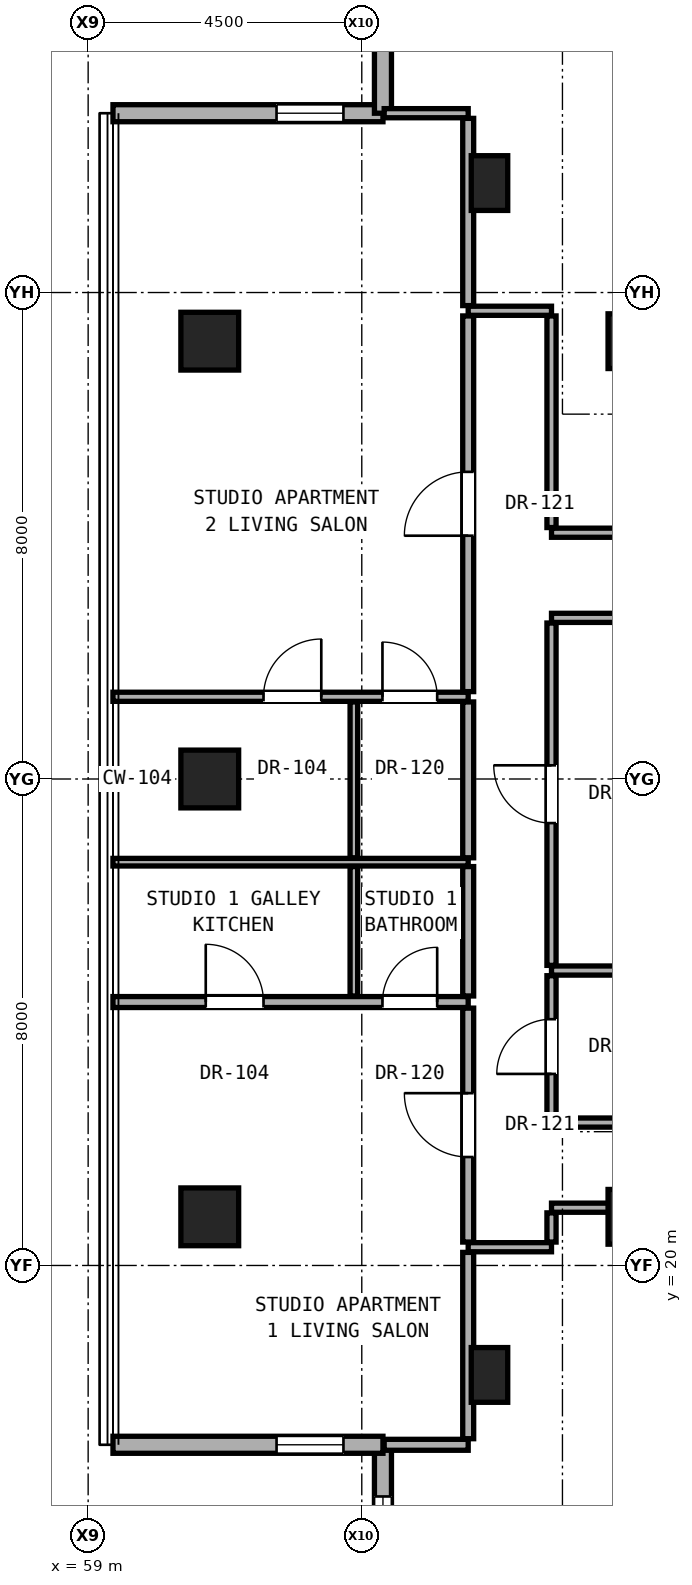
"""IFC4 building model, lengths in metres.
Left out: names, types, materials, properties, quantities, classifications, styles, units other than length and angle.
Written with IfcOpenShell. Run it as: python <this file> out.ifc"""

import sys

from ifc_helpers import new_model, si_unit, direction, frame, frame_2d, origin, origin_2d, place, context, subcontext, project, spatial, rectangle, hollow_rectangle, extrude, element, fill, save


model = new_model("IFC4")
c1 = context("Model", 3, precision=1e-05, world=origin(), true_north=direction((0.0, 1.0)))
c2 = subcontext(c1, "Body", "Model", "MODEL_VIEW")
j1 = project(units=[si_unit("LENGTHUNIT", "METRE"), si_unit("PLANEANGLEUNIT", "RADIAN")], contexts=[c1])
p1 = place(None, origin())
s1 = spatial("IfcSite", under=j1, at=p1, CompositionType="ELEMENT")
p2 = place(p1, origin())
s2 = spatial("IfcBuilding", under=s1, at=p2, CompositionType="ELEMENT")
p3 = place(p2, frame((0.0, 0.0, 193.4)))
s3 = spatial("IfcBuildingStorey", under=s2, at=p3, CompositionType="ELEMENT", Elevation=193.4)
for number, where, z_axis, x_axis in (
    (1, (68.0, 20.8, 0.0), (0.0, 0.0, 1.0), (1.0, 0.0, 0.0)),
    (2, (68.0, 35.2, 0.0), (0.0, 0.0, 1.0), (1.0, 0.0, 0.0)),
):
    element("IfcColumn", number, at=place(p3, frame(where, z_axis=z_axis, x_axis=x_axis)), inside=s3, PredefinedType="COLUMN", context=c2, shape_type="SweptSolid", body=[
        extrude(rectangle(XDim=0.9, YDim=0.9, at=origin_2d()), origin(), (0.0, 0.0, 1.0), 3.25),
    ])
for number, where, z_axis, x_axis in (
    (3, (61.0, 20.8, 0.0), (0.0, 0.0, 1.0), (1.0, 0.0, 0.0)),
    (4, (61.0, 28.0, 0.0), (0.0, 0.0, 1.0), (1.0, 0.0, 0.0)),
    (5, (61.0, 35.2, 0.0), (0.0, 0.0, 1.0), (1.0, 0.0, 0.0)),
):
    element("IfcColumn", number, at=place(p3, frame(where, z_axis=z_axis, x_axis=x_axis)), inside=s3, PredefinedType="COLUMN", context=c2, shape_type="SweptSolid", body=[
        extrude(hollow_rectangle(XDim=0.95, YDim=0.95, WallThickness=0.05, at=origin_2d()), origin(), (0.0, 0.0, 1.0), 3.25),
    ])
for number, where, z_axis, x_axis in (
    (6, (65.6, 18.2, 0.0), (0.0, 0.0, 1.0), (1.0, 0.0, 0.0)),
    (7, (65.6, 37.8, 0.0), (0.0, 0.0, 1.0), (1.0, 0.0, 0.0)),
):
    element("IfcColumn", number, at=place(p3, frame(where, z_axis=z_axis, x_axis=x_axis)), inside=s3, PredefinedType="PILASTER", context=c2, shape_type="SweptSolid", body=[
        extrude(rectangle(XDim=0.6, YDim=0.9, at=origin_2d()), origin(), (0.0, 0.0, 1.0), 3.25),
    ])
p4 = place(p3, frame((63.848, 17.051, 0.0), z_axis=(0.0, 0.0, 1.0), x_axis=(0.0, -1.0, 0.0)))
e8 = element("IfcWall", 8, at=p4, inside=s3, PredefinedType="SOLIDWALL", context=c2, shape_type="SweptSolid", body=[
    extrude(rectangle(XDim=4.44, YDim=0.28, at=frame_2d((2.22, 0.0))), origin(), (0.0, 0.0, 1.0), 3.03),
])
p5 = place(p4, frame((0.85, 0.0, 0.53)))
e9 = element("IfcOpeningElement", 9, at=p5, cuts=e8, PredefinedType="OPENING", context=c2, shape_type="SweptSolid", body=[
    extrude(rectangle(XDim=2.4, YDim=2.35, at=frame_2d((1.2, 1.175))), frame((0.0, 0.15, 0.0), z_axis=(0.0, -1.0, 0.0), x_axis=(1.0, 0.0, 0.0)), (0.0, 0.0, 1.0), 0.3),
])
p6 = place(p3, frame((59.408, 17.051, 0.0), z_axis=(0.0, 0.0, 1.0), x_axis=(1.0, 0.0, 0.0)))
e10 = element("IfcWall", 10, at=p6, inside=s3, PredefinedType="SOLIDWALL", context=c2, shape_type="SweptSolid", body=[
    extrude(rectangle(XDim=4.44, YDim=0.28, at=frame_2d((2.22, 0.0))), origin(), (0.0, 0.0, 1.0), 3.03),
])
p7 = place(p6, frame((2.69, 0.0, 0.85)))
e11 = element("IfcOpeningElement", 11, at=p7, cuts=e10, PredefinedType="OPENING", context=c2, shape_type="SweptSolid", body=[
    extrude(rectangle(XDim=1.1, YDim=2.0, at=frame_2d((0.55, 1.0))), frame((0.0, 0.15, 0.0), z_axis=(0.0, -1.0, 0.0), x_axis=(1.0, 0.0, 0.0)), (0.0, 0.0, 1.0), 0.3),
])
p8 = place(p3, frame((63.848, 38.949, 0.0), z_axis=(0.0, 0.0, 1.0), x_axis=(-1.0, 0.0, 0.0)))
e12 = element("IfcWall", 12, at=p8, inside=s3, PredefinedType="SOLIDWALL", context=c2, shape_type="SweptSolid", body=[
    extrude(rectangle(XDim=4.44, YDim=0.28, at=frame_2d((2.22, 0.0))), origin(), (0.0, 0.0, 1.0), 3.03),
])
p9 = place(p8, frame((0.65, 0.0, 0.85)))
e13 = element("IfcOpeningElement", 13, at=p9, cuts=e12, PredefinedType="OPENING", context=c2, shape_type="SweptSolid", body=[
    extrude(rectangle(XDim=1.1, YDim=2.0, at=frame_2d((0.55, 1.0))), frame((0.0, 0.15, 0.0), z_axis=(0.0, -1.0, 0.0), x_axis=(1.0, 0.0, 0.0)), (0.0, 0.0, 1.0), 0.3),
])
p10 = place(p3, frame((63.848, 43.388, 0.0), z_axis=(0.0, 0.0, 1.0), x_axis=(0.0, -1.0, 0.0)))
e14 = element("IfcWall", 14, at=p10, inside=s3, PredefinedType="SOLIDWALL", context=c2, shape_type="SweptSolid", body=[
    extrude(rectangle(XDim=4.44, YDim=0.28, at=frame_2d((2.22, 0.0))), origin(), (0.0, 0.0, 1.0), 3.03),
])
p11 = place(p3, frame((63.868, 17.051, 0.0), z_axis=(0.0, 0.0, 1.0), x_axis=(1.0, 0.0, 0.0)))
e15 = element("IfcWall", 15, at=p11, inside=s3, PredefinedType="PARTITIONING", context=c2, shape_type="SweptSolid", body=[
    extrude(rectangle(XDim=1.382, YDim=0.18, at=frame_2d((0.691, 0.0))), origin(), (0.0, 0.0, 1.0), 3.05),
])
p12 = place(p3, frame((65.25, 20.3, 0.0), z_axis=(0.0, 0.0, 1.0), x_axis=(1.0, 0.0, 0.0)))
e16 = element("IfcWall", 16, at=p12, inside=s3, PredefinedType="PARTITIONING", context=c2, shape_type="SweptSolid", body=[
    extrude(rectangle(XDim=1.37, YDim=0.15, at=frame_2d((0.685, 0.0))), origin(), (0.0, 0.0, 1.0), 3.05),
])
p13 = place(p3, frame((66.62, 20.95, 0.0), z_axis=(0.0, 0.0, 1.0), x_axis=(1.0, 0.0, 0.0)))
e17 = element("IfcWall", 17, at=p13, inside=s3, PredefinedType="PARTITIONING", context=c2, shape_type="SweptSolid", body=[
    extrude(rectangle(XDim=1.11, YDim=0.15, at=frame_2d((0.555, 0.0))), origin(), (0.0, 0.0, 1.0), 2.442),
])
p14 = place(p3, frame((66.62, 22.35, 0.0), z_axis=(0.0, 0.0, 1.0), x_axis=(1.0, 0.0, 0.0)))
e18 = element("IfcWall", 18, at=p14, inside=s3, PredefinedType="PARTITIONING", context=c2, shape_type="SweptSolid", body=[
    extrude(rectangle(XDim=10.14, YDim=0.15, at=frame_2d((5.07, 0.0))), origin(), (0.0, 0.0, 1.0), 2.186),
])
p15 = place(p3, frame((59.408, 24.332, 0.0), z_axis=(0.0, 0.0, 1.0), x_axis=(1.0, 0.0, 0.0)))
e19 = element("IfcWall", 19, at=p15, inside=s3, PredefinedType="PARTITIONING", context=c2, shape_type="SweptSolid", body=[
    extrude(rectangle(XDim=5.842, YDim=0.18, at=frame_2d((2.921, 0.0))), origin(), (0.0, 0.0, 1.0), 2.269),
])
p16 = place(p15, frame((1.526, 0.0, 0.0)))
e20 = element("IfcOpeningElement", 20, at=p16, cuts=e19, PredefinedType="OPENING", context=c2, shape_type="SweptSolid", body=[
    extrude(rectangle(XDim=0.95, YDim=2.15, at=frame_2d((0.475, 1.075))), frame((0.0, 0.1, 0.0), z_axis=(0.0, -1.0, 0.0), x_axis=(1.0, 0.0, 0.0)), (0.0, 0.0, 1.0), 0.2),
])
p17 = place(p15, frame((4.432, 0.0, 0.0)))
e21 = element("IfcOpeningElement", 21, at=p17, cuts=e19, PredefinedType="OPENING", context=c2, shape_type="SweptSolid", body=[
    extrude(rectangle(XDim=0.9, YDim=2.1, at=frame_2d((0.45, 1.05))), frame((0.0, 0.1, 0.0), z_axis=(0.0, -1.0, 0.0), x_axis=(1.0, 0.0, 0.0)), (0.0, 0.0, 1.0), 0.2),
])
p18 = place(p3, frame((66.62, 24.85, 0.0), z_axis=(0.0, 0.0, 1.0), x_axis=(1.0, 0.0, 0.0)))
e22 = element("IfcWall", 22, at=p18, inside=s3, PredefinedType="PARTITIONING", context=c2, shape_type="SweptSolid", body=[
    extrude(rectangle(XDim=3.13, YDim=0.15, at=frame_2d((1.565, 0.0))), origin(), (0.0, 0.0, 1.0), 2.186),
])
p19 = place(p3, frame((59.408, 26.632, 0.0), z_axis=(0.0, 0.0, 1.0), x_axis=(1.0, 0.0, 0.0)))
e23 = element("IfcWall", 23, at=p19, inside=s3, PredefinedType="PARTITIONING", context=c2, shape_type="SweptSolid", body=[
    extrude(rectangle(XDim=5.842, YDim=0.125, at=frame_2d((2.921, 0.0))), origin(), (0.0, 0.0, 1.0), 2.269),
])
p20 = place(p3, frame((59.408, 29.352, 0.0), z_axis=(0.0, 0.0, 1.0), x_axis=(1.0, 0.0, 0.0)))
e24 = element("IfcWall", 24, at=p20, inside=s3, PredefinedType="PARTITIONING", context=c2, shape_type="SweptSolid", body=[
    extrude(rectangle(XDim=5.842, YDim=0.15, at=frame_2d((2.921, 0.0))), origin(), (0.0, 0.0, 1.0), 2.269),
])
p21 = place(p20, frame((2.476, 0.0, 0.0)))
e25 = element("IfcOpeningElement", 25, at=p21, cuts=e24, PredefinedType="OPENING", context=c2, shape_type="SweptSolid", body=[
    extrude(rectangle(XDim=0.95, YDim=2.15, at=frame_2d((0.475, 1.075))), frame((0.0, 0.085, 0.0), z_axis=(0.0, -1.0, 0.0), x_axis=(1.0, 0.0, 0.0)), (0.0, 0.0, 1.0), 0.17),
])
p22 = place(p20, frame((4.432, 0.0, 0.0)))
e26 = element("IfcOpeningElement", 26, at=p22, cuts=e24, PredefinedType="OPENING", context=c2, shape_type="SweptSolid", body=[
    extrude(rectangle(XDim=0.9, YDim=2.1, at=frame_2d((0.45, 1.05))), frame((0.0, 0.085, 0.0), z_axis=(0.0, -1.0, 0.0), x_axis=(1.0, 0.0, 0.0)), (0.0, 0.0, 1.0), 0.17),
])
p23 = place(p3, frame((66.62, 30.65, 0.0), z_axis=(0.0, 0.0, 1.0), x_axis=(1.0, 0.0, 0.0)))
e27 = element("IfcWall", 27, at=p23, inside=s3, PredefinedType="PARTITIONING", context=c2, shape_type="SweptSolid", body=[
    extrude(rectangle(XDim=10.14, YDim=0.15, at=frame_2d((5.07, 0.0))), origin(), (0.0, 0.0, 1.0), 2.186),
])
p24 = place(p23, frame((6.14, 0.0, 0.0)))
e28 = element("IfcOpeningElement", 28, at=p24, cuts=e27, PredefinedType="OPENING", context=c2, shape_type="SweptSolid", body=[
    extrude(rectangle(XDim=0.95, YDim=2.15, at=frame_2d((0.475, 1.075))), frame((0.0, 0.085, 0.0), z_axis=(0.0, -1.0, 0.0), x_axis=(1.0, 0.0, 0.0)), (0.0, 0.0, 1.0), 0.17),
])
p25 = place(p3, frame((66.62, 32.05, 0.0), z_axis=(0.0, 0.0, 1.0), x_axis=(1.0, 0.0, 0.0)))
e29 = element("IfcWall", 29, at=p25, inside=s3, PredefinedType="PARTITIONING", context=c2, shape_type="SweptSolid", body=[
    extrude(rectangle(XDim=2.18, YDim=0.15, at=frame_2d((1.09, 0.0))), origin(), (0.0, 0.0, 1.0), 2.186),
])
p26 = place(p3, frame((65.25, 35.7, 0.0), z_axis=(0.0, 0.0, 1.0), x_axis=(1.0, 0.0, 0.0)))
e30 = element("IfcWall", 30, at=p26, inside=s3, PredefinedType="PARTITIONING", context=c2, shape_type="SweptSolid", body=[
    extrude(rectangle(XDim=1.37, YDim=0.15, at=frame_2d((0.685, 0.0))), origin(), (0.0, 0.0, 1.0), 3.05),
])
p27 = place(p3, frame((63.868, 38.949, 0.0), z_axis=(0.0, 0.0, 1.0), x_axis=(1.0, 0.0, 0.0)))
e31 = element("IfcWall", 31, at=p27, inside=s3, PredefinedType="PARTITIONING", context=c2, shape_type="SweptSolid", body=[
    extrude(rectangle(XDim=1.382, YDim=0.15, at=frame_2d((0.691, 0.0))), origin(), (0.0, 0.0, 1.0), 3.05),
])
p28 = place(p3, frame((63.37, 24.432, 0.0), z_axis=(0.0, 0.0, 1.0), x_axis=(0.0, 1.0, 0.0)))
e32 = element("IfcWall", 32, at=p28, inside=s3, PredefinedType="PARTITIONING", context=c2, shape_type="SweptSolid", body=[
    extrude(rectangle(XDim=2.128, YDim=0.125, at=frame_2d((1.064, 0.0))), origin(), (0.0, 0.0, 1.0), 3.05),
])
p29 = place(p3, frame((63.37, 26.705, 0.0), z_axis=(0.0, 0.0, 1.0), x_axis=(0.0, 1.0, 0.0)))
e33 = element("IfcWall", 33, at=p29, inside=s3, PredefinedType="PARTITIONING", context=c2, shape_type="SweptSolid", body=[
    extrude(rectangle(XDim=2.562, YDim=0.125, at=frame_2d((1.281, 0.0))), origin(), (0.0, 0.0, 1.0), 2.346),
])
p30 = place(p3, frame((65.25, 17.151, 0.0), z_axis=(0.0, 0.0, 1.0), x_axis=(0.0, 1.0, 0.0)))
e34 = element("IfcWall", 34, at=p30, inside=s3, PredefinedType="PARTITIONING", context=c2, shape_type="SweptSolid", body=[
    extrude(rectangle(XDim=3.064, YDim=0.18, at=frame_2d((1.532, 0.0))), origin(), (0.0, 0.0, 1.0), 2.493),
])
p31 = place(p3, frame((65.25, 20.385, 0.0), z_axis=(0.0, 0.0, 1.0), x_axis=(0.0, 1.0, 0.0)))
e35 = element("IfcWall", 35, at=p31, inside=s3, PredefinedType="PARTITIONING", context=c2, shape_type="SweptSolid", body=[
    extrude(rectangle(XDim=3.847, YDim=0.18, at=frame_2d((1.923, 0.0))), origin(), (0.0, 0.0, 1.0), 2.442),
])
p32 = place(p31, frame((1.398, 0.0, 0.0)))
e36 = element("IfcOpeningElement", 36, at=p32, cuts=e35, PredefinedType="OPENING", context=c2, shape_type="SweptSolid", body=[
    extrude(rectangle(XDim=1.05, YDim=2.2, at=frame_2d((0.525, 1.1))), frame((0.0, 0.1, 0.0), z_axis=(0.0, -1.0, 0.0), x_axis=(1.0, 0.0, 0.0)), (0.0, 0.0, 1.0), 0.2),
])
p33 = place(p3, frame((65.25, 24.432, 0.0), z_axis=(0.0, 0.0, 1.0), x_axis=(0.0, 1.0, 0.0)))
e37 = element("IfcWall", 37, at=p33, inside=s3, PredefinedType="PARTITIONING", context=c2, shape_type="SweptSolid", body=[
    extrude(rectangle(XDim=2.128, YDim=0.18, at=frame_2d((1.064, 0.0))), origin(), (0.0, 0.0, 1.0), 3.05),
])
p34 = place(p3, frame((65.25, 26.705, 0.0), z_axis=(0.0, 0.0, 1.0), x_axis=(0.0, 1.0, 0.0)))
e38 = element("IfcWall", 38, at=p34, inside=s3, PredefinedType="PARTITIONING", context=c2, shape_type="SweptSolid", body=[
    extrude(rectangle(XDim=2.562, YDim=0.18, at=frame_2d((1.281, 0.0))), origin(), (0.0, 0.0, 1.0), 2.346),
])
p35 = place(p3, frame((65.25, 29.437, 0.0), z_axis=(0.0, 0.0, 1.0), x_axis=(0.0, 1.0, 0.0)))
e39 = element("IfcWall", 39, at=p35, inside=s3, PredefinedType="PARTITIONING", context=c2, shape_type="SweptSolid", body=[
    extrude(rectangle(XDim=6.178, YDim=0.18, at=frame_2d((3.089, 0.0))), origin(), (0.0, 0.0, 1.0), 2.442),
])
p36 = place(p35, frame((2.564, 0.0, 0.0)))
e40 = element("IfcOpeningElement", 40, at=p36, cuts=e39, PredefinedType="OPENING", context=c2, shape_type="SweptSolid", body=[
    extrude(rectangle(XDim=1.05, YDim=2.2, at=frame_2d((0.525, 1.1))), frame((0.0, 0.1, 0.0), z_axis=(0.0, -1.0, 0.0), x_axis=(1.0, 0.0, 0.0)), (0.0, 0.0, 1.0), 0.2),
])
p37 = place(p3, frame((65.25, 35.785, 0.0), z_axis=(0.0, 0.0, 1.0), x_axis=(0.0, 1.0, 0.0)))
e41 = element("IfcWall", 41, at=p37, inside=s3, PredefinedType="PARTITIONING", context=c2, shape_type="SweptSolid", body=[
    extrude(rectangle(XDim=3.079, YDim=0.18, at=frame_2d((1.54, 0.0))), origin(), (0.0, 0.0, 1.0), 2.493),
])
p38 = place(p3, frame((66.62, 20.385, 0.0), z_axis=(0.0, 0.0, 1.0), x_axis=(0.0, 1.0, 0.0)))
e42 = element("IfcWall", 42, at=p38, inside=s3, PredefinedType="PARTITIONING", context=c2, shape_type="SweptSolid", body=[
    extrude(rectangle(XDim=0.48, YDim=0.15, at=frame_2d((0.24, 0.0))), origin(), (0.0, 0.0, 1.0), 2.442),
])
p39 = place(p3, frame((66.62, 22.435, 0.0), z_axis=(0.0, 0.0, 1.0), x_axis=(0.0, 1.0, 0.0)))
e43 = element("IfcWall", 43, at=p39, inside=s3, PredefinedType="PARTITIONING", context=c2, shape_type="SweptSolid", body=[
    extrude(rectangle(XDim=2.33, YDim=0.15, at=frame_2d((1.165, 0.0))), origin(), (0.0, 0.0, 1.0), 3.05),
])
p40 = place(p39, frame((0.715, 0.0, 0.0)))
e44 = element("IfcOpeningElement", 44, at=p40, cuts=e43, PredefinedType="OPENING", context=c2, shape_type="SweptSolid", body=[
    extrude(rectangle(XDim=0.9, YDim=2.1, at=frame_2d((0.45, 1.05))), frame((0.0, 0.085, 0.0), z_axis=(0.0, -1.0, 0.0), x_axis=(1.0, 0.0, 0.0)), (0.0, 0.0, 1.0), 0.17),
])
p41 = place(p3, frame((66.62, 24.935, 0.0), z_axis=(0.0, 0.0, 1.0), x_axis=(0.0, 1.0, 0.0)))
e45 = element("IfcWall", 45, at=p41, inside=s3, PredefinedType="PARTITIONING", context=c2, shape_type="SweptSolid", body=[
    extrude(rectangle(XDim=5.63, YDim=0.15, at=frame_2d((2.815, 0.0))), origin(), (0.0, 0.0, 1.0), 2.346),
])
p42 = place(p41, frame((2.34, 0.0, 0.0)))
e46 = element("IfcOpeningElement", 46, at=p42, cuts=e45, PredefinedType="OPENING", context=c2, shape_type="SweptSolid", body=[
    extrude(rectangle(XDim=0.95, YDim=2.15, at=frame_2d((0.475, 1.075))), frame((0.0, 0.085, 0.0), z_axis=(0.0, -1.0, 0.0), x_axis=(1.0, 0.0, 0.0)), (0.0, 0.0, 1.0), 0.17),
])
p43 = place(p3, frame((66.62, 32.135, 0.0), z_axis=(0.0, 0.0, 1.0), x_axis=(0.0, 1.0, 0.0)))
e47 = element("IfcWall", 47, at=p43, inside=s3, PredefinedType="PARTITIONING", context=c2, shape_type="SweptSolid", body=[
    extrude(rectangle(XDim=3.48, YDim=0.15, at=frame_2d((1.74, 0.0))), origin(), (0.0, 0.0, 1.0), 2.442),
])
p44 = place(p5, origin())
e48 = element("IfcWindow", 48, at=p44, inside=s3, PartitioningType="SINGLE_PANEL", PredefinedType="WINDOW", context=c2, shape_type="SweptSolid", body=[
    extrude(rectangle(XDim=2.4, YDim=2.35, at=frame_2d((1.2, 1.175))), frame((0.0, 0.03, 0.0), z_axis=(0.0, -1.0, 0.0), x_axis=(1.0, 0.0, 0.0)), (0.0, 0.0, 1.0), 0.06),
])
fill(e9, e48)
p45 = place(p7, origin())
e49 = element("IfcWindow", 49, at=p45, inside=s3, PartitioningType="SINGLE_PANEL", PredefinedType="WINDOW", context=c2, shape_type="SweptSolid", body=[
    extrude(rectangle(XDim=1.1, YDim=2.0, at=frame_2d((0.55, 1.0))), frame((0.0, 0.03, 0.0), z_axis=(0.0, -1.0, 0.0), x_axis=(1.0, 0.0, 0.0)), (0.0, 0.0, 1.0), 0.06),
])
fill(e11, e49)
p46 = place(p9, origin())
e50 = element("IfcWindow", 50, at=p46, inside=s3, PartitioningType="SINGLE_PANEL", PredefinedType="WINDOW", context=c2, shape_type="SweptSolid", body=[
    extrude(rectangle(XDim=1.1, YDim=2.0, at=frame_2d((0.55, 1.0))), frame((0.0, 0.03, 0.0), z_axis=(0.0, -1.0, 0.0), x_axis=(1.0, 0.0, 0.0)), (0.0, 0.0, 1.0), 0.06),
])
fill(e13, e50)
p47 = place(p40, origin())
e51 = element("IfcDoor", 51, at=p47, inside=s3, OperationType="SINGLE_SWING_LEFT", PredefinedType="DOOR", context=c2, shape_type="SweptSolid", body=[
    extrude(rectangle(XDim=0.9, YDim=2.1, at=frame_2d((0.45, 1.05))), frame((0.0, 0.025, 0.0), z_axis=(0.0, -1.0, 0.0), x_axis=(1.0, 0.0, 0.0)), (0.0, 0.0, 1.0), 0.05),
])
fill(e44, e51)
p48 = place(p32, origin())
e52 = element("IfcDoor", 52, at=p48, inside=s3, OperationType="SINGLE_SWING_RIGHT", PredefinedType="DOOR", context=c2, shape_type="SweptSolid", body=[
    extrude(rectangle(XDim=1.05, YDim=2.2, at=frame_2d((0.525, 1.1))), frame((0.0, 0.025, 0.0), z_axis=(0.0, -1.0, 0.0), x_axis=(1.0, 0.0, 0.0)), (0.0, 0.0, 1.0), 0.05),
])
fill(e36, e52)
p49 = place(p16, origin())
e53 = element("IfcDoor", 53, at=p49, inside=s3, OperationType="SINGLE_SWING_LEFT", PredefinedType="DOOR", context=c2, shape_type="SweptSolid", body=[
    extrude(rectangle(XDim=0.95, YDim=2.15, at=frame_2d((0.475, 1.075))), frame((0.0, 0.025, 0.0), z_axis=(0.0, -1.0, 0.0), x_axis=(1.0, 0.0, 0.0)), (0.0, 0.0, 1.0), 0.05),
])
fill(e20, e53)
p50 = place(p17, origin())
e54 = element("IfcDoor", 54, at=p50, inside=s3, OperationType="SINGLE_SWING_RIGHT", PredefinedType="DOOR", context=c2, shape_type="SweptSolid", body=[
    extrude(rectangle(XDim=0.9, YDim=2.1, at=frame_2d((0.45, 1.05))), frame((0.0, 0.025, 0.0), z_axis=(0.0, -1.0, 0.0), x_axis=(1.0, 0.0, 0.0)), (0.0, 0.0, 1.0), 0.05),
])
fill(e21, e54)
p51 = place(p36, origin())
e55 = element("IfcDoor", 55, at=p51, inside=s3, OperationType="SINGLE_SWING_LEFT", PredefinedType="DOOR", context=c2, shape_type="SweptSolid", body=[
    extrude(rectangle(XDim=1.05, YDim=2.2, at=frame_2d((0.525, 1.1))), frame((0.0, 0.025, 0.0), z_axis=(0.0, -1.0, 0.0), x_axis=(1.0, 0.0, 0.0)), (0.0, 0.0, 1.0), 0.05),
])
fill(e40, e55)
p52 = place(p21, origin())
e56 = element("IfcDoor", 56, at=p52, inside=s3, OperationType="SINGLE_SWING_RIGHT", PredefinedType="DOOR", context=c2, shape_type="SweptSolid", body=[
    extrude(rectangle(XDim=0.95, YDim=2.15, at=frame_2d((0.475, 1.075))), frame((0.0, 0.025, 0.0), z_axis=(0.0, -1.0, 0.0), x_axis=(1.0, 0.0, 0.0)), (0.0, 0.0, 1.0), 0.05),
])
fill(e25, e56)
p53 = place(p22, origin())
e57 = element("IfcDoor", 57, at=p53, inside=s3, OperationType="SINGLE_SWING_LEFT", PredefinedType="DOOR", context=c2, shape_type="SweptSolid", body=[
    extrude(rectangle(XDim=0.9, YDim=2.1, at=frame_2d((0.45, 1.05))), frame((0.0, 0.025, 0.0), z_axis=(0.0, -1.0, 0.0), x_axis=(1.0, 0.0, 0.0)), (0.0, 0.0, 1.0), 0.05),
])
fill(e26, e57)
p54 = place(p42, origin())
e58 = element("IfcDoor", 58, at=p54, inside=s3, OperationType="SINGLE_SWING_RIGHT", PredefinedType="DOOR", context=c2, shape_type="SweptSolid", body=[
    extrude(rectangle(XDim=0.95, YDim=2.15, at=frame_2d((0.475, 1.075))), frame((0.0, 0.025, 0.0), z_axis=(0.0, -1.0, 0.0), x_axis=(1.0, 0.0, 0.0)), (0.0, 0.0, 1.0), 0.05),
])
fill(e46, e58)
save(model, sys.argv[1])
